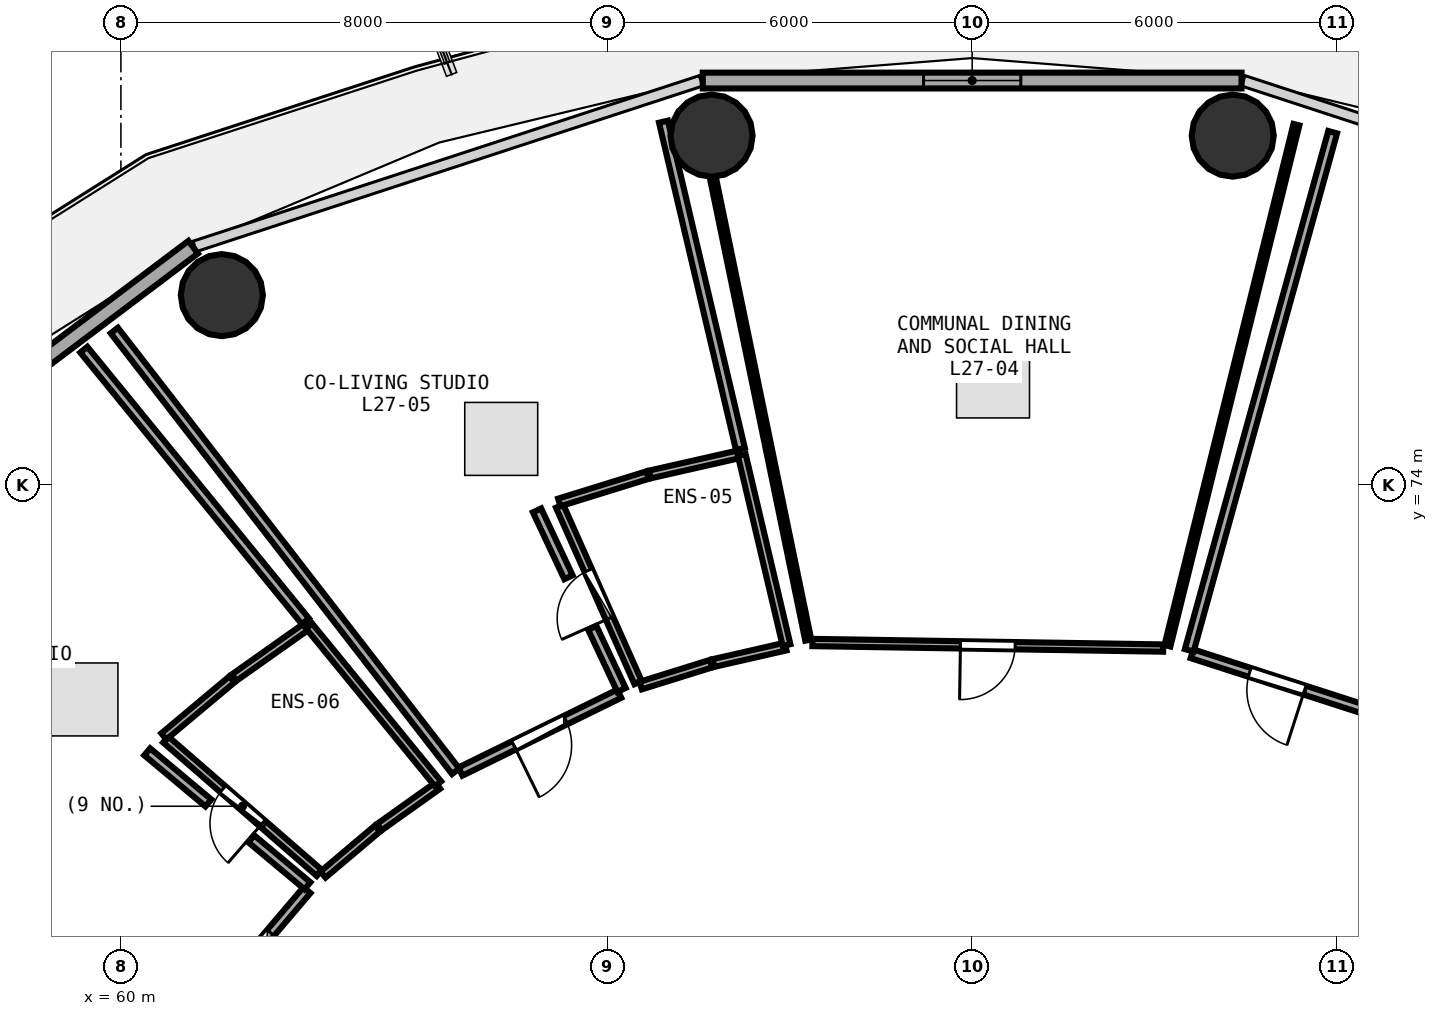
"""IFC4 building model, lengths in metres.
Left out: names, types, materials, properties, quantities, classifications, styles, units other than length and angle.
Written with IfcOpenShell. Run it as: python <this file> out.ifc"""

import sys

from ifc_helpers import new_model, si_unit, direction, frame, frame_2d, origin, origin_2d, place, context, subcontext, project, spatial, rectangle, circle, extrude, element, fill, save


model = new_model("IFC4")
c1 = context("Model", 3, precision=1e-05, world=origin(), true_north=direction((0.0, 1.0)))
c2 = subcontext(c1, "Body", "Model", "MODEL_VIEW")
j1 = project(units=[si_unit("LENGTHUNIT", "METRE"), si_unit("PLANEANGLEUNIT", "RADIAN")], contexts=[c1])
p1 = place(None, origin())
s1 = spatial("IfcSite", under=j1, at=p1, CompositionType="ELEMENT")
p2 = place(p1, origin())
s2 = spatial("IfcBuilding", under=s1, at=p2, CompositionType="ELEMENT")
p3 = place(p2, frame((0.0, 0.0, 106.35)))
s3 = spatial("IfcBuildingStorey", under=s2, at=p3, CompositionType="ELEMENT", Elevation=106.35)
for number, where, z_axis, x_axis in (
    (1, (78.286, 79.745, 0.0), (0.0, 0.0, 1.0), (1.0, 0.0, 0.0)),
    (2, (69.714, 79.745, 0.0), (0.0, 0.0, 1.0), (1.0, 0.0, 0.0)),
    (3, (61.66, 77.122, 0.0), (0.0, 0.0, 1.0), (1.0, 0.0, 0.0)),
):
    element("IfcColumn", number, at=place(p3, frame(where, z_axis=z_axis, x_axis=x_axis)), inside=s3, PredefinedType="COLUMN", context=c2, shape_type="SweptSolid", body=[
        extrude(circle(Radius=0.675, at=origin_2d()), origin(), (0.0, 0.0, 1.0), 3.75),
    ])
p4 = place(p3, frame((78.43, 80.651, 0.0), z_axis=(0.0, 0.0, 1.0), x_axis=(-1.0, 0.0, 0.0)))
e4 = element("IfcWall", 4, at=p4, inside=s3, PredefinedType="SOLIDWALL", context=c2, shape_type="SweptSolid", body=[
    extrude(rectangle(XDim=8.861, YDim=0.26, at=frame_2d((4.43, 0.0))), origin(), (0.0, 0.0, 1.0), 3.475),
])
p5 = place(p4, frame((3.63, 0.0, 0.85)))
e5 = element("IfcOpeningElement", 5, at=p5, cuts=e4, PredefinedType="OPENING", context=c2, shape_type="SweptSolid", body=[
    extrude(rectangle(XDim=1.6, YDim=1.45, at=frame_2d((0.8, 0.725))), frame((0.0, 0.14, 0.0), z_axis=(0.0, -1.0, 0.0), x_axis=(1.0, 0.0, 0.0)), (0.0, 0.0, 1.0), 0.28),
])
p6 = place(p3, frame((61.188, 77.91, 0.0), z_axis=(0.0, 0.0, 1.0), x_axis=(-0.798501507879, -0.601992808857, 0.0)))
e6 = element("IfcWall", 6, at=p6, inside=s3, PredefinedType="SOLIDWALL", context=c2, shape_type="SweptSolid", body=[
    extrude(rectangle(XDim=8.499, YDim=0.26, at=frame_2d((4.25, 0.0))), origin(), (0.0, 0.0, 1.0), 3.475),
])
p7 = place(p6, frame((3.45, 0.0, 0.85)))
e7 = element("IfcOpeningElement", 7, at=p7, cuts=e6, PredefinedType="OPENING", context=c2, shape_type="SweptSolid", body=[
    extrude(rectangle(XDim=1.6, YDim=1.45, at=frame_2d((0.8, 0.725))), frame((0.0, 0.14, 0.0), z_axis=(0.0, -1.0, 0.0), x_axis=(1.0, 0.0, 0.0)), (0.0, 0.0, 1.0), 0.28),
])
p8 = place(p3, frame((80.415, 70.32, 0.0), z_axis=(0.0, 0.0, 1.0), x_axis=(-0.951622481895, 0.307269673009, 0.0)))
e8 = element("IfcWall", 8, at=p8, inside=s3, PredefinedType="PARTITIONING", context=c2, shape_type="SweptSolid", body=[
    extrude(rectangle(XDim=2.94, YDim=0.15, at=frame_2d((1.47, 0.0))), origin(), (0.0, 0.0, 1.0), 3.235),
])
p9 = place(p8, frame((0.995, 0.0, 0.0)))
e9 = element("IfcOpeningElement", 9, at=p9, cuts=e8, PredefinedType="OPENING", context=c2, shape_type="SweptSolid", body=[
    extrude(rectangle(XDim=0.95, YDim=2.08, at=frame_2d((0.475, 1.04))), frame((0.0, 0.085, 0.0), z_axis=(0.0, -1.0, 0.0), x_axis=(1.0, 0.0, 0.0)), (0.0, 0.0, 1.0), 0.17),
])
p10 = place(p3, frame((77.142, 71.318, 0.0), z_axis=(0.0, 0.0, 1.0), x_axis=(-0.999874771211, 0.015825356091, 0.0)))
e10 = element("IfcWall", 10, at=p10, inside=s3, PredefinedType="PARTITIONING", context=c2, shape_type="SweptSolid", body=[
    extrude(rectangle(XDim=5.77, YDim=0.12, at=frame_2d((2.885, 0.0))), origin(), (0.0, 0.0, 1.0), 3.48),
])
p11 = place(p10, frame((2.435, 0.0, 0.0)))
e11 = element("IfcOpeningElement", 11, at=p11, cuts=e10, PredefinedType="OPENING", context=c2, shape_type="SweptSolid", body=[
    extrude(rectangle(XDim=0.9, YDim=2.08, at=frame_2d((0.45, 1.04))), frame((0.0, 0.07, 0.0), z_axis=(0.0, -1.0, 0.0), x_axis=(1.0, 0.0, 0.0)), (0.0, 0.0, 1.0), 0.14),
])
p12 = place(p3, frame((68.506, 70.75, 0.0), z_axis=(0.0, 0.0, 1.0), x_axis=(-0.406231177337, 0.913770337973, 0.0)))
e12 = element("IfcWall", 12, at=p12, inside=s3, PredefinedType="PLUMBINGWALL", context=c2, shape_type="SweptSolid", body=[
    extrude(rectangle(XDim=3.176, YDim=0.13, at=frame_2d((1.588, 0.0))), origin(), (0.0, 0.0, 1.0), 3.175),
])
p13 = place(p12, frame((1.158, 0.0, 0.0)))
e13 = element("IfcOpeningElement", 13, at=p13, cuts=e12, PredefinedType="OPENING", context=c2, shape_type="SweptSolid", body=[
    extrude(rectangle(XDim=0.86, YDim=2.05, at=frame_2d((0.43, 1.025))), frame((0.0, 0.075, 0.0), z_axis=(0.0, -1.0, 0.0), x_axis=(1.0, 0.0, 0.0)), (0.0, 0.0, 1.0), 0.15),
])
p14 = place(p3, frame((68.196, 70.567, 0.0), z_axis=(0.0, 0.0, 1.0), x_axis=(-0.89794088417, -0.440116085296, 0.0)))
e14 = element("IfcWall", 14, at=p14, inside=s3, PredefinedType="PARTITIONING", context=c2, shape_type="SweptSolid", body=[
    extrude(rectangle(XDim=2.909, YDim=0.15, at=frame_2d((1.455, 0.0))), origin(), (0.0, 0.0, 1.0), 3.235),
])
p15 = place(p14, frame((0.98, 0.0, 0.0)))
e15 = element("IfcOpeningElement", 15, at=p15, cuts=e14, PredefinedType="OPENING", context=c2, shape_type="SweptSolid", body=[
    extrude(rectangle(XDim=0.95, YDim=2.08, at=frame_2d((0.475, 1.04))), frame((0.0, 0.085, 0.0), z_axis=(0.0, -1.0, 0.0), x_axis=(1.0, 0.0, 0.0)), (0.0, 0.0, 1.0), 0.17),
])
p16 = place(p3, frame((63.264, 67.619, 0.0), z_axis=(0.0, 0.0, 1.0), x_axis=(-0.75497608509, 0.65575232439, 0.0)))
e16 = element("IfcWall", 16, at=p16, inside=s3, PredefinedType="PLUMBINGWALL", context=c2, shape_type="SweptSolid", body=[
    extrude(rectangle(XDim=3.346, YDim=0.13, at=frame_2d((1.673, 0.0))), origin(), (0.0, 0.0, 1.0), 3.235),
])
p17 = place(p16, frame((1.243, 0.0, 0.0)))
e17 = element("IfcOpeningElement", 17, at=p17, cuts=e16, PredefinedType="OPENING", context=c2, shape_type="SweptSolid", body=[
    extrude(rectangle(XDim=0.86, YDim=2.05, at=frame_2d((0.43, 1.025))), frame((0.0, 0.075, 0.0), z_axis=(0.0, -1.0, 0.0), x_axis=(1.0, 0.0, 0.0)), (0.0, 0.0, 1.0), 0.15),
])
p18 = place(p3, frame((63.06, 67.337, 0.0), z_axis=(0.0, 0.0, 1.0), x_axis=(-0.647519081114, -0.762049236988, 0.0)))
e18 = element("IfcWall", 18, at=p18, inside=s3, PredefinedType="PARTITIONING", context=c2, shape_type="SweptSolid", body=[
    extrude(rectangle(XDim=2.795, YDim=0.15, at=frame_2d((1.397, 0.0))), origin(), (0.0, 0.0, 1.0), 2.925),
])
p19 = place(p18, frame((0.922, 0.0, 0.0)))
e19 = element("IfcOpeningElement", 19, at=p19, cuts=e18, PredefinedType="OPENING", context=c2, shape_type="SweptSolid", body=[
    extrude(rectangle(XDim=0.95, YDim=2.08, at=frame_2d((0.475, 1.04))), frame((0.0, 0.085, 0.0), z_axis=(0.0, -1.0, 0.0), x_axis=(1.0, 0.0, 0.0)), (0.0, 0.0, 1.0), 0.17),
])
p20 = place(p3, frame((77.571, 71.281, 0.0), z_axis=(0.0, 0.0, 1.0), x_axis=(0.266746506471, 0.963766725554, 0.0)))
e20 = element("IfcWall", 20, at=p20, inside=s3, PredefinedType="PARTITIONING", context=c2, shape_type="SweptSolid", body=[
    extrude(rectangle(XDim=8.841, YDim=0.15, at=frame_2d((4.421, 0.0))), origin(), (0.0, 0.0, 1.0), 2.925),
])
p21 = place(p3, frame((71.305, 71.449, 0.0), z_axis=(0.0, 0.0, 1.0), x_axis=(-0.202123638545, 0.979360012836, 0.0)))
e21 = element("IfcWall", 21, at=p21, inside=s3, PredefinedType="PARTITIONING", context=c2, shape_type="SweptSolid", body=[
    extrude(rectangle(XDim=7.756, YDim=0.1, at=frame_2d((3.878, 0.0))), origin(), (0.0, 0.0, 1.0), 2.925),
])
p22 = place(p3, frame((79.333, 79.925, 0.0), z_axis=(0.0, 0.0, 1.0), x_axis=(-0.240342194274, -0.970688224741, 0.0)))
e22 = element("IfcWall", 22, at=p22, inside=s3, PredefinedType="PARTITIONING", context=c2, shape_type="SweptSolid", body=[
    extrude(rectangle(XDim=8.828, YDim=0.1, at=frame_2d((4.414, 0.0))), origin(), (0.0, 0.0, 1.0), 2.925),
])
p23 = place(p3, frame((70.933, 71.343, 0.0), z_axis=(0.0, 0.0, 1.0), x_axis=(-0.974915720647, -0.222574341818, 0.0)))
e23 = element("IfcWall", 23, at=p23, inside=s3, PredefinedType="PLUMBINGWALL", context=c2, shape_type="SweptSolid", body=[
    extrude(rectangle(XDim=1.218, YDim=0.13, at=frame_2d((0.609, 0.0))), origin(), (0.0, 0.0, 1.0), 2.925),
])
p24 = place(p3, frame((69.707, 71.061, 0.0), z_axis=(0.0, 0.0, 1.0), x_axis=(-0.954873275734, -0.297013513646, 0.0)))
e24 = element("IfcWall", 24, at=p24, inside=s3, PredefinedType="PLUMBINGWALL", context=c2, shape_type="SweptSolid", body=[
    extrude(rectangle(XDim=1.212, YDim=0.13, at=frame_2d((0.606, 0.0))), origin(), (0.0, 0.0, 1.0), 3.48),
])
p25 = place(p3, frame((67.21, 73.713, 0.0), z_axis=(0.0, 0.0, 1.0), x_axis=(0.955249123401, 0.295802488566, 0.0)))
e25 = element("IfcWall", 25, at=p25, inside=s3, PredefinedType="PLUMBINGWALL", context=c2, shape_type="SweptSolid", body=[
    extrude(rectangle(XDim=1.519, YDim=0.13, at=frame_2d((0.759, 0.0))), origin(), (0.0, 0.0, 1.0), 3.48),
])
p26 = place(p3, frame((68.699, 74.172, 0.0), z_axis=(0.0, 0.0, 1.0), x_axis=(0.975247540647, 0.221115884688, 0.0)))
e26 = element("IfcWall", 26, at=p26, inside=s3, PredefinedType="PLUMBINGWALL", context=c2, shape_type="SweptSolid", body=[
    extrude(rectangle(XDim=1.525, YDim=0.13, at=frame_2d((0.762, 0.0))), origin(), (0.0, 0.0, 1.0), 2.925),
])
p27 = place(p3, frame((70.211, 74.494, 0.0), z_axis=(0.0, 0.0, 1.0), x_axis=(0.229284929256, -0.973359348451, 0.0)))
e27 = element("IfcWall", 27, at=p27, inside=s3, PredefinedType="PLUMBINGWALL", context=c2, shape_type="SweptSolid", body=[
    extrude(rectangle(XDim=3.214, YDim=0.13, at=frame_2d((1.607, 0.0))), origin(), (0.0, 0.0, 1.0), 2.925),
])
p28 = place(p3, frame((65.506, 69.292, 0.0), z_axis=(0.0, 0.0, 1.0), x_axis=(-0.612364923916, 0.790575233585, 0.0)))
e28 = element("IfcWall", 28, at=p28, inside=s3, PredefinedType="PARTITIONING", context=c2, shape_type="SweptSolid", body=[
    extrude(rectangle(XDim=9.168, YDim=0.15, at=frame_2d((4.584, 0.0))), origin(), (0.0, 0.0, 1.0), 2.925),
])
p29 = place(p3, frame((68.923, 79.974, 0.0), z_axis=(0.0, 0.0, 1.0), x_axis=(0.228901508724, -0.973449587449, 0.0)))
e29 = element("IfcWall", 29, at=p29, inside=s3, PredefinedType="PARTITIONING", context=c2, shape_type="SweptSolid", body=[
    extrude(rectangle(XDim=5.529, YDim=0.15, at=frame_2d((2.765, 0.0))), origin(), (0.0, 0.0, 1.0), 2.925),
])
p30 = place(p3, frame((66.844, 73.582, 0.0), z_axis=(0.0, 0.0, 1.0), x_axis=(0.42562282943, -0.904900661436, 0.0)))
e30 = element("IfcWall", 30, at=p30, inside=s3, PredefinedType="PARTITIONING", context=c2, shape_type="SweptSolid", body=[
    extrude(rectangle(XDim=1.215, YDim=0.15, at=frame_2d((0.607, 0.0))), origin(), (0.0, 0.0, 1.0), 3.175),
])
p31 = place(p3, frame((67.753, 71.65, 0.0), z_axis=(0.0, 0.0, 1.0), x_axis=(0.425609366017, -0.904906993872, 0.0)))
e31 = element("IfcWall", 31, at=p31, inside=s3, PredefinedType="PARTITIONING", context=c2, shape_type="SweptSolid", body=[
    extrude(rectangle(XDim=1.128, YDim=0.15, at=frame_2d((0.564, 0.0))), origin(), (0.0, 0.0, 1.0), 3.48),
])
p32 = place(p3, frame((65.213, 69.057, 0.0), z_axis=(0.0, 0.0, 1.0), x_axis=(-0.814779575245, -0.579770854531, 0.0)))
e32 = element("IfcWall", 32, at=p32, inside=s3, PredefinedType="PLUMBINGWALL", context=c2, shape_type="SweptSolid", body=[
    extrude(rectangle(XDim=1.181, YDim=0.13, at=frame_2d((0.591, 0.0))), origin(), (0.0, 0.0, 1.0), 2.925),
])
p33 = place(p3, frame((64.219, 68.348, 0.0), z_axis=(0.0, 0.0, 1.0), x_axis=(-0.764137277769, -0.645053657244, 0.0)))
e33 = element("IfcWall", 33, at=p33, inside=s3, PredefinedType="PLUMBINGWALL", context=c2, shape_type="SweptSolid", body=[
    extrude(rectangle(XDim=1.171, YDim=0.13, at=frame_2d((0.585, 0.0))), origin(), (0.0, 0.0, 1.0), 3.48),
])
p34 = place(p3, frame((60.707, 69.866, 0.0), z_axis=(0.0, 0.0, 1.0), x_axis=(0.766482767596, 0.642264872913, 0.0)))
e34 = element("IfcWall", 34, at=p34, inside=s3, PredefinedType="PLUMBINGWALL", context=c2, shape_type="SweptSolid", body=[
    extrude(rectangle(XDim=1.464, YDim=0.13, at=frame_2d((0.732, 0.0))), origin(), (0.0, 0.0, 1.0), 3.48),
])
p35 = place(p3, frame((61.861, 70.831, 0.0), z_axis=(0.0, 0.0, 1.0), x_axis=(0.816339578676, 0.577572239886, 0.0)))
e35 = element("IfcWall", 35, at=p35, inside=s3, PredefinedType="PLUMBINGWALL", context=c2, shape_type="SweptSolid", body=[
    extrude(rectangle(XDim=1.477, YDim=0.13, at=frame_2d((0.738, 0.0))), origin(), (0.0, 0.0, 1.0), 3.48),
])
p36 = place(p3, frame((63.096, 71.679, 0.0), z_axis=(0.0, 0.0, 1.0), x_axis=(0.632781461548, -0.774330434583, 0.0)))
e36 = element("IfcWall", 36, at=p36, inside=s3, PredefinedType="PLUMBINGWALL", context=c2, shape_type="SweptSolid", body=[
    extrude(rectangle(XDim=3.351, YDim=0.13, at=frame_2d((1.676, 0.0))), origin(), (0.0, 0.0, 1.0), 2.925),
])
p37 = place(p3, frame((61.177, 65.181, 0.0), z_axis=(0.0, 0.0, 1.0), x_axis=(-0.878445909545, 0.477841798092, 0.0)))
e37 = element("IfcWall", 37, at=p37, inside=s3, PredefinedType="PARTITIONING", context=c2, shape_type="SweptSolid", body=[
    extrude(rectangle(XDim=9.653, YDim=0.15, at=frame_2d((4.827, 0.0))), origin(), (0.0, 0.0, 1.0), 2.925),
])
p38 = place(p3, frame((59.39, 76.225, 0.0), z_axis=(0.0, 0.0, 1.0), x_axis=(0.632139440809, -0.774854649192, 0.0)))
e38 = element("IfcWall", 38, at=p38, inside=s3, PredefinedType="PARTITIONING", context=c2, shape_type="SweptSolid", body=[
    extrude(rectangle(XDim=5.765, YDim=0.15, at=frame_2d((2.882, 0.0))), origin(), (0.0, 0.0, 1.0), 2.975),
])
p39 = place(p3, frame((60.433, 69.611, 0.0), z_axis=(0.0, 0.0, 1.0), x_axis=(0.767335111176, -0.641246307714, 0.0)))
e39 = element("IfcWall", 39, at=p39, inside=s3, PredefinedType="PARTITIONING", context=c2, shape_type="SweptSolid", body=[
    extrude(rectangle(XDim=1.311, YDim=0.15, at=frame_2d((0.655, 0.0))), origin(), (0.0, 0.0, 1.0), 3.48),
])
p40 = place(p3, frame((62.145, 68.181, 0.0), z_axis=(0.0, 0.0, 1.0), x_axis=(0.767356229846, -0.641221035616, 0.0)))
e40 = element("IfcWall", 40, at=p40, inside=s3, PredefinedType="PARTITIONING", context=c2, shape_type="SweptSolid", body=[
    extrude(rectangle(XDim=1.204, YDim=0.15, at=frame_2d((0.602, 0.0))), origin(), (0.0, 0.0, 1.0), 3.235),
])
p41 = place(p3, frame((52.382, 69.324, 0.0), z_axis=(0.0, 0.0, 1.0), x_axis=(0.889175506344, -0.457566300025, 0.0)))
e41 = element("IfcWall", 41, at=p41, inside=s3, PredefinedType="PARTITIONING", context=c2, shape_type="SweptSolid", body=[
    extrude(rectangle(XDim=9.678, YDim=0.1, at=frame_2d((4.839, 0.0))), origin(), (0.0, 0.0, 1.0), 2.925),
])
p42 = place(p5, origin())
e42 = element("IfcWindow", 42, at=p42, inside=s3, PartitioningType="SINGLE_PANEL", PredefinedType="WINDOW", context=c2, shape_type="SweptSolid", body=[
    extrude(rectangle(XDim=1.6, YDim=1.45, at=frame_2d((0.8, 0.725))), frame((0.0, 0.03, 0.0), z_axis=(0.0, -1.0, 0.0), x_axis=(1.0, 0.0, 0.0)), (0.0, 0.0, 1.0), 0.06),
])
fill(e5, e42)
p43 = place(p9, origin())
e43 = element("IfcDoor", 43, at=p43, inside=s3, OperationType="SINGLE_SWING_LEFT", PredefinedType="DOOR", context=c2, shape_type="SweptSolid", body=[
    extrude(rectangle(XDim=0.95, YDim=2.08, at=frame_2d((0.475, 1.04))), frame((0.0, 0.025, 0.0), z_axis=(0.0, -1.0, 0.0), x_axis=(1.0, 0.0, 0.0)), (0.0, 0.0, 1.0), 0.05),
])
fill(e9, e43)
p44 = place(p11, origin())
e44 = element("IfcDoor", 44, at=p44, inside=s3, OperationType="SINGLE_SWING_RIGHT", PredefinedType="DOOR", context=c2, shape_type="SweptSolid", body=[
    extrude(rectangle(XDim=0.9, YDim=2.08, at=frame_2d((0.45, 1.04))), frame((0.0, 0.025, 0.0), z_axis=(0.0, -1.0, 0.0), x_axis=(1.0, 0.0, 0.0)), (0.0, 0.0, 1.0), 0.05),
])
fill(e11, e44)
p45 = place(p13, origin())
e45 = element("IfcDoor", 45, at=p45, inside=s3, OperationType="SINGLE_SWING_LEFT", PredefinedType="DOOR", context=c2, shape_type="SweptSolid", body=[
    extrude(rectangle(XDim=0.86, YDim=2.05, at=frame_2d((0.43, 1.025))), frame((0.0, 0.025, 0.0), z_axis=(0.0, -1.0, 0.0), x_axis=(1.0, 0.0, 0.0)), (0.0, 0.0, 1.0), 0.05),
])
fill(e13, e45)
p46 = place(p15, origin())
e46 = element("IfcDoor", 46, at=p46, inside=s3, OperationType="SINGLE_SWING_RIGHT", PredefinedType="DOOR", context=c2, shape_type="SweptSolid", body=[
    extrude(rectangle(XDim=0.95, YDim=2.08, at=frame_2d((0.475, 1.04))), frame((0.0, 0.025, 0.0), z_axis=(0.0, -1.0, 0.0), x_axis=(1.0, 0.0, 0.0)), (0.0, 0.0, 1.0), 0.05),
])
fill(e15, e46)
p47 = place(p17, origin())
e47 = element("IfcDoor", 47, at=p47, inside=s3, OperationType="SINGLE_SWING_LEFT", PredefinedType="DOOR", context=c2, shape_type="SweptSolid", body=[
    extrude(rectangle(XDim=0.86, YDim=2.05, at=frame_2d((0.43, 1.025))), frame((0.0, 0.025, 0.0), z_axis=(0.0, -1.0, 0.0), x_axis=(1.0, 0.0, 0.0)), (0.0, 0.0, 1.0), 0.05),
])
fill(e17, e47)
p48 = place(p19, origin())
e48 = element("IfcDoor", 48, at=p48, inside=s3, OperationType="SINGLE_SWING_RIGHT", PredefinedType="DOOR", context=c2, shape_type="SweptSolid", body=[
    extrude(rectangle(XDim=0.95, YDim=2.08, at=frame_2d((0.475, 1.04))), frame((0.0, 0.025, 0.0), z_axis=(0.0, -1.0, 0.0), x_axis=(1.0, 0.0, 0.0)), (0.0, 0.0, 1.0), 0.05),
])
fill(e19, e48)
save(model, sys.argv[1])
